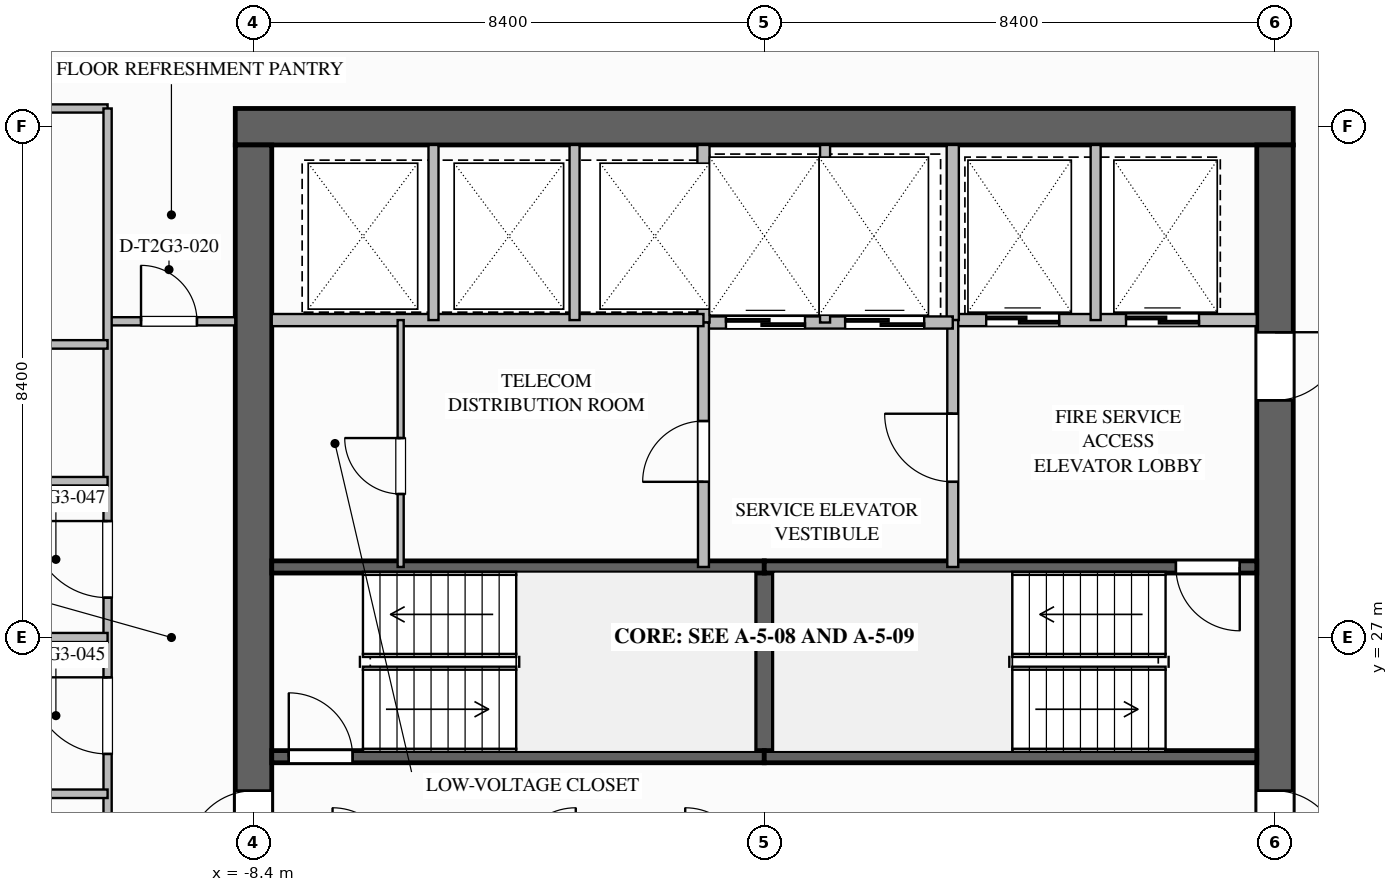
"""IFC4 building model, lengths in metres.
Left out: names, types, materials, properties, quantities, classifications, styles, units other than length and angle.
Written with IfcOpenShell. Run it as: python <this file> out.ifc"""

import sys

from ifc_helpers import new_model, si_unit, direction, frame, frame_2d, origin, place, context, subcontext, project, spatial, rectangle, extrude, element, fill, save


model = new_model("IFC4")
c1 = context("Model", 3, precision=1e-05, world=origin(), true_north=direction((0.0, 1.0)))
c2 = subcontext(c1, "Body", "Model", "MODEL_VIEW")
j1 = project(units=[si_unit("LENGTHUNIT", "METRE"), si_unit("PLANEANGLEUNIT", "RADIAN")], contexts=[c1])
p1 = place(None, origin())
s1 = spatial("IfcSite", under=j1, at=p1, CompositionType="ELEMENT")
p2 = place(p1, origin())
s2 = spatial("IfcBuilding", under=s1, at=p2, CompositionType="ELEMENT")
p3 = place(p2, frame((0.0, 0.0, 112.8)))
s3 = spatial("IfcBuildingStorey", under=s2, at=p3, CompositionType="ELEMENT", Elevation=112.8)
p4 = place(p3, frame((-8.7, 35.4, 0.0), z_axis=(0.0, 0.0, 1.0), x_axis=(1.0, 0.0, 0.0)))
e1 = element("IfcWall", 1, at=p4, inside=s3, PredefinedType="SHEAR", context=c2, shape_type="SweptSolid", body=[
    extrude(rectangle(XDim=17.4, YDim=0.6, at=frame_2d((8.7, 0.0))), origin(), (0.0, 0.0, 1.0), 3.5),
])
p5 = place(p3, frame((8.4, 35.1, 0.0), z_axis=(0.0, 0.0, 1.0), x_axis=(0.0, -1.0, 0.0)))
e2 = element("IfcWall", 2, at=p5, inside=s3, PredefinedType="SHEAR", context=c2, shape_type="SweptSolid", body=[
    extrude(rectangle(XDim=16.2, YDim=0.6, at=frame_2d((8.1, 0.0))), origin(), (0.0, 0.0, 1.0), 3.5),
])
p6 = place(p5, frame((3.08, 0.0, 0.0)))
e3 = element("IfcOpeningElement", 3, at=p6, cuts=e2, PredefinedType="OPENING", context=c2, shape_type="SweptSolid", body=[
    extrude(rectangle(XDim=1.12, YDim=2.1, at=frame_2d((0.56, 1.05))), frame((0.0, 0.31, 0.0), z_axis=(0.0, -1.0, 0.0), x_axis=(1.0, 0.0, 0.0)), (0.0, 0.0, 1.0), 0.62),
])
p7 = place(p5, frame((10.62, 0.0, 0.0)))
e4 = element("IfcOpeningElement", 4, at=p7, cuts=e2, PredefinedType="OPENING", context=c2, shape_type="SweptSolid", body=[
    extrude(rectangle(XDim=1.08, YDim=2.04, at=frame_2d((0.54, 1.02))), frame((0.0, 0.31, 0.0), z_axis=(0.0, -1.0, 0.0), x_axis=(1.0, 0.0, 0.0)), (0.0, 0.0, 1.0), 0.62),
])
p8 = place(p3, frame((-8.4, 18.9, 0.0), z_axis=(0.0, 0.0, 1.0), x_axis=(0.0, 1.0, 0.0)))
e5 = element("IfcWall", 5, at=p8, inside=s3, PredefinedType="SHEAR", context=c2, shape_type="SweptSolid", body=[
    extrude(rectangle(XDim=16.2, YDim=0.6, at=frame_2d((8.1, 0.0))), origin(), (0.0, 0.0, 1.0), 3.5),
])
p9 = place(p8, frame((4.5, 0.0, 0.0)))
e6 = element("IfcOpeningElement", 6, at=p9, cuts=e5, PredefinedType="OPENING", context=c2, shape_type="SweptSolid", body=[
    extrude(rectangle(XDim=1.08, YDim=2.04, at=frame_2d((0.54, 1.02))), frame((0.0, 0.31, 0.0), z_axis=(0.0, -1.0, 0.0), x_axis=(1.0, 0.0, 0.0)), (0.0, 0.0, 1.0), 0.62),
])
p10 = place(p3, frame((0.0, 25.04, 0.0), z_axis=(0.0, 0.0, 1.0), x_axis=(0.0, 1.0, 0.0)))
e7 = element("IfcWall", 7, at=p10, inside=s3, PredefinedType="SOLIDWALL", context=c2, shape_type="SweptSolid", body=[
    extrude(rectangle(XDim=3.12, YDim=0.3, at=frame_2d((1.56, 0.0))), origin(), (0.0, 0.0, 1.0), 3.24),
])
p11 = place(p3, frame((-8.1, 25.04, 0.0), z_axis=(0.0, 0.0, 1.0), x_axis=(1.0, 0.0, 0.0)))
e8 = element("IfcWall", 8, at=p11, inside=s3, PredefinedType="SOLIDWALL", context=c2, shape_type="SweptSolid", body=[
    extrude(rectangle(XDim=8.1, YDim=0.2, at=frame_2d((4.05, 0.0))), origin(), (0.0, 0.0, 1.0), 3.24),
])
p12 = place(p11, frame((0.28, 0.0, 0.0)))
e9 = element("IfcOpeningElement", 9, at=p12, cuts=e8, PredefinedType="OPENING", context=c2, shape_type="SweptSolid", body=[
    extrude(rectangle(XDim=1.05, YDim=2.1, at=frame_2d((0.525, 1.05))), frame((0.0, 0.11, 0.0), z_axis=(0.0, -1.0, 0.0), x_axis=(1.0, 0.0, 0.0)), (0.0, 0.0, 1.0), 0.22),
])
for number, where, z_axis, x_axis in (
    (10, (-8.1, 28.16, 0.0), (0.0, 0.0, 1.0), (1.0, 0.0, 0.0)),
    (11, (0.0, 25.04, 0.0), (0.0, 0.0, 1.0), (1.0, 0.0, 0.0)),
):
    element("IfcWall", number, at=place(p3, frame(where, z_axis=z_axis, x_axis=x_axis)), inside=s3, PredefinedType="SOLIDWALL", context=c2, shape_type="SweptSolid", body=[
        extrude(rectangle(XDim=8.1, YDim=0.2, at=frame_2d((4.05, 0.0))), origin(), (0.0, 0.0, 1.0), 3.24),
    ])
p13 = place(p3, frame((8.1, 28.16, 0.0), z_axis=(0.0, 0.0, 1.0), x_axis=(-1.0, 0.0, 0.0)))
e12 = element("IfcWall", 12, at=p13, inside=s3, PredefinedType="SOLIDWALL", context=c2, shape_type="SweptSolid", body=[
    extrude(rectangle(XDim=8.1, YDim=0.2, at=frame_2d((4.05, 0.0))), origin(), (0.0, 0.0, 1.0), 3.24),
])
p14 = place(p13, frame((0.28, 0.0, 0.0)))
e13 = element("IfcOpeningElement", 13, at=p14, cuts=e12, PredefinedType="OPENING", context=c2, shape_type="SweptSolid", body=[
    extrude(rectangle(XDim=1.05, YDim=2.1, at=frame_2d((0.525, 1.05))), frame((0.0, 0.11, 0.0), z_axis=(0.0, -1.0, 0.0), x_axis=(1.0, 0.0, 0.0)), (0.0, 0.0, 1.0), 0.22),
])
p15 = place(p3, frame((3.1, 32.22, 0.0), z_axis=(0.0, 0.0, 1.0), x_axis=(1.0, 0.0, 0.0)))
e14 = element("IfcWall", 14, at=p15, inside=s3, PredefinedType="SOLIDWALL", context=c2, shape_type="SweptSolid", body=[
    extrude(rectangle(XDim=5.0, YDim=0.2, at=frame_2d((2.5, 0.0))), origin(), (0.0, 0.0, 1.0), 3.24),
])
p16 = place(p15, frame((0.55, 0.0, 0.0)))
e15 = element("IfcOpeningElement", 15, at=p16, cuts=e14, PredefinedType="OPENING", context=c2, shape_type="SweptSolid", body=[
    extrude(rectangle(XDim=1.2, YDim=2.2, at=frame_2d((0.6, 1.1))), frame((0.0, 0.11, 0.0), z_axis=(0.0, -1.0, 0.0), x_axis=(1.0, 0.0, 0.0)), (0.0, 0.0, 1.0), 0.22),
])
p17 = place(p15, frame((2.85, 0.0, 0.0)))
e16 = element("IfcOpeningElement", 16, at=p17, cuts=e14, PredefinedType="OPENING", context=c2, shape_type="SweptSolid", body=[
    extrude(rectangle(XDim=1.2, YDim=2.2, at=frame_2d((0.6, 1.1))), frame((0.0, 0.11, 0.0), z_axis=(0.0, -1.0, 0.0), x_axis=(1.0, 0.0, 0.0)), (0.0, 0.0, 1.0), 0.22),
])
p18 = place(p3, frame((3.1, 32.22, 0.0), z_axis=(0.0, 0.0, 1.0), x_axis=(0.0, 1.0, 0.0)))
e17 = element("IfcWall", 17, at=p18, inside=s3, PredefinedType="SOLIDWALL", context=c2, shape_type="SweptSolid", body=[
    extrude(rectangle(XDim=2.88, YDim=0.2, at=frame_2d((1.44, 0.0))), origin(), (0.0, 0.0, 1.0), 3.24),
])
p19 = place(p3, frame((5.45, 32.22, 0.0), z_axis=(0.0, 0.0, 1.0), x_axis=(0.0, 1.0, 0.0)))
e18 = element("IfcWall", 18, at=p19, inside=s3, PredefinedType="PARTITIONING", context=c2, shape_type="SweptSolid", body=[
    extrude(rectangle(XDim=2.88, YDim=0.165, at=frame_2d((1.44, 0.0))), origin(), (0.0, 0.0, 1.0), 3.24),
])
p20 = place(p3, frame((3.1, 28.16, 0.0), z_axis=(0.0, 0.0, 1.0), x_axis=(0.0, 1.0, 0.0)))
e19 = element("IfcWall", 19, at=p20, inside=s3, PredefinedType="SOLIDWALL", context=c2, shape_type="SweptSolid", body=[
    extrude(rectangle(XDim=4.06, YDim=0.18, at=frame_2d((2.03, 0.0))), origin(), (0.0, 0.0, 1.0), 3.24),
])
p21 = place(p20, frame((1.4, 0.0, 0.0)))
e20 = element("IfcOpeningElement", 20, at=p21, cuts=e19, PredefinedType="OPENING", context=c2, shape_type="SweptSolid", body=[
    extrude(rectangle(XDim=1.12, YDim=2.1, at=frame_2d((0.56, 1.05))), frame((0.0, 0.1, 0.0), z_axis=(0.0, -1.0, 0.0), x_axis=(1.0, 0.0, 0.0)), (0.0, 0.0, 1.0), 0.2),
])
p22 = place(p3, frame((-1.0, 32.18, 0.0), z_axis=(0.0, 0.0, 1.0), x_axis=(1.0, 0.0, 0.0)))
e21 = element("IfcWall", 21, at=p22, inside=s3, PredefinedType="SOLIDWALL", context=c2, shape_type="SweptSolid", body=[
    extrude(rectangle(XDim=4.1, YDim=0.2, at=frame_2d((2.05, 0.0))), origin(), (0.0, 0.0, 1.0), 3.24),
])
p23 = place(p22, frame((0.37, 0.0, 0.0)))
e22 = element("IfcOpeningElement", 22, at=p23, cuts=e21, PredefinedType="OPENING", context=c2, shape_type="SweptSolid", body=[
    extrude(rectangle(XDim=1.3, YDim=2.2, at=frame_2d((0.65, 1.1))), frame((0.0, 0.11, 0.0), z_axis=(0.0, -1.0, 0.0), x_axis=(1.0, 0.0, 0.0)), (0.0, 0.0, 1.0), 0.22),
])
p24 = place(p22, frame((2.33, 0.0, 0.0)))
e23 = element("IfcOpeningElement", 23, at=p24, cuts=e21, PredefinedType="OPENING", context=c2, shape_type="SweptSolid", body=[
    extrude(rectangle(XDim=1.3, YDim=2.2, at=frame_2d((0.65, 1.1))), frame((0.0, 0.11, 0.0), z_axis=(0.0, -1.0, 0.0), x_axis=(1.0, 0.0, 0.0)), (0.0, 0.0, 1.0), 0.22),
])
p25 = place(p3, frame((-1.0, 32.18, 0.0), z_axis=(0.0, 0.0, 1.0), x_axis=(0.0, 1.0, 0.0)))
e24 = element("IfcWall", 24, at=p25, inside=s3, PredefinedType="SOLIDWALL", context=c2, shape_type="SweptSolid", body=[
    extrude(rectangle(XDim=2.92, YDim=0.2, at=frame_2d((1.46, 0.0))), origin(), (0.0, 0.0, 1.0), 3.24),
])
p26 = place(p3, frame((1.0, 32.18, 0.0), z_axis=(0.0, 0.0, 1.0), x_axis=(0.0, 1.0, 0.0)))
e25 = element("IfcWall", 25, at=p26, inside=s3, PredefinedType="PARTITIONING", context=c2, shape_type="SweptSolid", body=[
    extrude(rectangle(XDim=2.92, YDim=0.165, at=frame_2d((1.46, 0.0))), origin(), (0.0, 0.0, 1.0), 3.24),
])
p27 = place(p3, frame((-1.0, 28.16, 0.0), z_axis=(0.0, 0.0, 1.0), x_axis=(0.0, 1.0, 0.0)))
e26 = element("IfcWall", 26, at=p27, inside=s3, PredefinedType="SOLIDWALL", context=c2, shape_type="SweptSolid", body=[
    extrude(rectangle(XDim=4.02, YDim=0.18, at=frame_2d((2.01, 0.0))), origin(), (0.0, 0.0, 1.0), 3.24),
])
p28 = place(p27, frame((1.4, 0.0, 0.0)))
e27 = element("IfcOpeningElement", 27, at=p28, cuts=e26, PredefinedType="OPENING", context=c2, shape_type="SweptSolid", body=[
    extrude(rectangle(XDim=1.0, YDim=2.1, at=frame_2d((0.5, 1.05))), frame((0.0, 0.1, 0.0), z_axis=(0.0, -1.0, 0.0), x_axis=(1.0, 0.0, 0.0)), (0.0, 0.0, 1.0), 0.2),
])
p29 = place(p3, frame((-8.1, 32.22, 0.0), z_axis=(0.0, 0.0, 1.0), x_axis=(1.0, 0.0, 0.0)))
e28 = element("IfcWall", 28, at=p29, inside=s3, PredefinedType="SOLIDWALL", context=c2, shape_type="SweptSolid", body=[
    extrude(rectangle(XDim=7.1, YDim=0.2, at=frame_2d((3.55, 0.0))), origin(), (0.0, 0.0, 1.0), 3.24),
])
for number, where, z_axis, x_axis in (
    (29, (-5.44, 32.22, 0.0), (0.0, 0.0, 1.0), (0.0, 1.0, 0.0)),
    (30, (-3.12, 32.22, 0.0), (0.0, 0.0, 1.0), (0.0, 1.0, 0.0)),
):
    element("IfcWall", number, at=place(p3, frame(where, z_axis=z_axis, x_axis=x_axis)), inside=s3, PredefinedType="PARTITIONING", context=c2, shape_type="SweptSolid", body=[
        extrude(rectangle(XDim=2.88, YDim=0.165, at=frame_2d((1.44, 0.0))), origin(), (0.0, 0.0, 1.0), 3.24),
    ])
p30 = place(p3, frame((-5.98, 28.16, 0.0), z_axis=(0.0, 0.0, 1.0), x_axis=(0.0, 1.0, 0.0)))
e31 = element("IfcWall", 31, at=p30, inside=s3, PredefinedType="PARTITIONING", context=c2, shape_type="SweptSolid", body=[
    extrude(rectangle(XDim=4.06, YDim=0.1, at=frame_2d((2.03, 0.0))), origin(), (0.0, 0.0, 1.0), 3.24),
])
p31 = place(p30, frame((1.2, 0.0, 0.0)))
e32 = element("IfcOpeningElement", 32, at=p31, cuts=e31, PredefinedType="OPENING", context=c2, shape_type="SweptSolid", body=[
    extrude(rectangle(XDim=0.92, YDim=2.1, at=frame_2d((0.46, 1.05))), frame((0.0, 0.06, 0.0), z_axis=(0.0, -1.0, 0.0), x_axis=(1.0, 0.0, 0.0)), (0.0, 0.0, 1.0), 0.12),
])
p32 = place(p3, frame((-10.8, 32.2, 0.0), z_axis=(0.0, 0.0, 1.0), x_axis=(1.0, 0.0, 0.0)))
e33 = element("IfcWall", 33, at=p32, inside=s3, PredefinedType="PARTITIONING", context=c2, shape_type="SweptSolid", body=[
    extrude(rectangle(XDim=2.1, YDim=0.135, at=frame_2d((1.05, 0.0))), origin(), (0.0, 0.0, 1.0), 3.24),
])
p33 = place(p32, frame((0.55, 0.0, 0.0)))
e34 = element("IfcOpeningElement", 34, at=p33, cuts=e33, PredefinedType="OPENING", context=c2, shape_type="SweptSolid", body=[
    extrude(rectangle(XDim=0.92, YDim=2.1, at=frame_2d((0.46, 1.05))), frame((0.0, 0.077, 0.0), z_axis=(0.0, -1.0, 0.0), x_axis=(1.0, 0.0, 0.0)), (0.0, 0.0, 1.0), 0.155),
])
p34 = place(p3, frame((-16.2, 35.7, 0.0), z_axis=(0.0, 0.0, 1.0), x_axis=(1.0, 0.0, 0.0)))
e35 = element("IfcWall", 35, at=p34, inside=s3, PredefinedType="PARTITIONING", context=c2, shape_type="SweptSolid", body=[
    extrude(rectangle(XDim=5.4, YDim=0.135, at=frame_2d((2.7, 0.0))), origin(), (0.0, 0.0, 1.0), 3.24),
])
p35 = place(p3, frame((-10.8, 18.3, 0.0), z_axis=(0.0, 0.0, 1.0), x_axis=(0.0, 1.0, 0.0)))
e36 = element("IfcWall", 36, at=p35, inside=s3, PredefinedType="PARTITIONING", context=c2, shape_type="SweptSolid", body=[
    extrude(rectangle(XDim=17.4, YDim=0.135, at=frame_2d((8.7, 0.0))), origin(), (0.0, 0.0, 1.0), 3.24),
])
p36 = place(p35, frame((6.785, 0.0, 0.0)))
e37 = element("IfcOpeningElement", 37, at=p36, cuts=e36, PredefinedType="OPENING", context=c2, shape_type="SweptSolid", body=[
    extrude(rectangle(XDim=1.26, YDim=2.2, at=frame_2d((0.63, 1.1))), frame((0.0, 0.077, 0.0), z_axis=(0.0, -1.0, 0.0), x_axis=(1.0, 0.0, 0.0)), (0.0, 0.0, 1.0), 0.155),
])
p37 = place(p35, frame((9.355, 0.0, 0.0)))
e38 = element("IfcOpeningElement", 38, at=p37, cuts=e36, PredefinedType="OPENING", context=c2, shape_type="SweptSolid", body=[
    extrude(rectangle(XDim=1.26, YDim=2.2, at=frame_2d((0.63, 1.1))), frame((0.0, 0.077, 0.0), z_axis=(0.0, -1.0, 0.0), x_axis=(1.0, 0.0, 0.0)), (0.0, 0.0, 1.0), 0.155),
])
p38 = place(p3, frame((-26.2, 27.0, 0.0), z_axis=(0.0, 0.0, 1.0), x_axis=(1.0, 0.0, 0.0)))
e39 = element("IfcWall", 39, at=p38, inside=s3, PredefinedType="PARTITIONING", context=c2, shape_type="SweptSolid", body=[
    extrude(rectangle(XDim=15.4, YDim=0.15, at=frame_2d((7.7, 0.0))), origin(), (0.0, 0.0, 1.0), 2.452),
])
for number, where, z_axis, x_axis in (
    (40, (-10.8, 24.43, 0.0), (0.0, 0.0, 1.0), (-1.0, 0.0, 0.0)),
    (41, (-10.8, 29.57, 0.0), (0.0, 0.0, 1.0), (-1.0, 0.0, 0.0)),
    (42, (-10.8, 31.82, 0.0), (0.0, 0.0, 1.0), (-1.0, 0.0, 0.0)),
):
    element("IfcWall", number, at=place(p3, frame(where, z_axis=z_axis, x_axis=x_axis)), inside=s3, PredefinedType="PLUMBINGWALL", context=c2, shape_type="SweptSolid", body=[
        extrude(rectangle(XDim=2.15, YDim=0.14, at=frame_2d((1.075, 0.0))), origin(), (0.0, 0.0, 1.0), 3.24),
    ])
p39 = place(p12, origin())
e43 = element("IfcDoor", 43, at=p39, inside=s3, OperationType="SINGLE_SWING_LEFT", PredefinedType="DOOR", context=c2, shape_type="SweptSolid", body=[
    extrude(rectangle(XDim=1.05, YDim=2.1, at=frame_2d((0.525, 1.05))), frame((0.0, 0.025, 0.0), z_axis=(0.0, -1.0, 0.0), x_axis=(1.0, 0.0, 0.0)), (0.0, 0.0, 1.0), 0.05),
])
fill(e9, e43)
p40 = place(p14, origin())
e44 = element("IfcDoor", 44, at=p40, inside=s3, OperationType="SINGLE_SWING_LEFT", PredefinedType="DOOR", context=c2, shape_type="SweptSolid", body=[
    extrude(rectangle(XDim=1.05, YDim=2.1, at=frame_2d((0.525, 1.05))), frame((0.0, 0.025, 0.0), z_axis=(0.0, -1.0, 0.0), x_axis=(1.0, 0.0, 0.0)), (0.0, 0.0, 1.0), 0.05),
])
fill(e13, e44)
p41 = place(p16, origin())
e45 = element("IfcDoor", 45, at=p41, inside=s3, OperationType="SLIDING_TO_LEFT", PredefinedType="DOOR", context=c2, shape_type="SweptSolid", body=[
    extrude(rectangle(XDim=1.2, YDim=2.2, at=frame_2d((0.6, 1.1))), frame((0.0, 0.025, 0.0), z_axis=(0.0, -1.0, 0.0), x_axis=(1.0, 0.0, 0.0)), (0.0, 0.0, 1.0), 0.05),
])
fill(e15, e45)
p42 = place(p17, origin())
e46 = element("IfcDoor", 46, at=p42, inside=s3, OperationType="SLIDING_TO_LEFT", PredefinedType="DOOR", context=c2, shape_type="SweptSolid", body=[
    extrude(rectangle(XDim=1.2, YDim=2.2, at=frame_2d((0.6, 1.1))), frame((0.0, 0.025, 0.0), z_axis=(0.0, -1.0, 0.0), x_axis=(1.0, 0.0, 0.0)), (0.0, 0.0, 1.0), 0.05),
])
fill(e16, e46)
p43 = place(p21, origin())
e47 = element("IfcDoor", 47, at=p43, inside=s3, OperationType="SINGLE_SWING_RIGHT", PredefinedType="DOOR", context=c2, shape_type="SweptSolid", body=[
    extrude(rectangle(XDim=1.12, YDim=2.1, at=frame_2d((0.56, 1.05))), frame((0.0, 0.025, 0.0), z_axis=(0.0, -1.0, 0.0), x_axis=(1.0, 0.0, 0.0)), (0.0, 0.0, 1.0), 0.05),
])
fill(e20, e47)
p44 = place(p6, origin())
e48 = element("IfcDoor", 48, at=p44, inside=s3, OperationType="SINGLE_SWING_LEFT", PredefinedType="DOOR", context=c2, shape_type="SweptSolid", body=[
    extrude(rectangle(XDim=1.12, YDim=2.1, at=frame_2d((0.56, 1.05))), frame((0.0, 0.025, 0.0), z_axis=(0.0, -1.0, 0.0), x_axis=(1.0, 0.0, 0.0)), (0.0, 0.0, 1.0), 0.05),
])
fill(e3, e48)
p45 = place(p23, origin())
e49 = element("IfcDoor", 49, at=p45, inside=s3, OperationType="SLIDING_TO_LEFT", PredefinedType="DOOR", context=c2, shape_type="SweptSolid", body=[
    extrude(rectangle(XDim=1.3, YDim=2.2, at=frame_2d((0.65, 1.1))), frame((0.0, 0.025, 0.0), z_axis=(0.0, -1.0, 0.0), x_axis=(1.0, 0.0, 0.0)), (0.0, 0.0, 1.0), 0.05),
])
fill(e22, e49)
p46 = place(p24, origin())
e50 = element("IfcDoor", 50, at=p46, inside=s3, OperationType="SLIDING_TO_LEFT", PredefinedType="DOOR", context=c2, shape_type="SweptSolid", body=[
    extrude(rectangle(XDim=1.3, YDim=2.2, at=frame_2d((0.65, 1.1))), frame((0.0, 0.025, 0.0), z_axis=(0.0, -1.0, 0.0), x_axis=(1.0, 0.0, 0.0)), (0.0, 0.0, 1.0), 0.05),
])
fill(e23, e50)
p47 = place(p28, origin())
e51 = element("IfcDoor", 51, at=p47, inside=s3, OperationType="SINGLE_SWING_LEFT", PredefinedType="DOOR", context=c2, shape_type="SweptSolid", body=[
    extrude(rectangle(XDim=1.0, YDim=2.1, at=frame_2d((0.5, 1.05))), frame((0.0, 0.025, 0.0), z_axis=(0.0, -1.0, 0.0), x_axis=(1.0, 0.0, 0.0)), (0.0, 0.0, 1.0), 0.05),
])
fill(e27, e51)
p48 = place(p31, origin())
e52 = element("IfcDoor", 52, at=p48, inside=s3, OperationType="SINGLE_SWING_RIGHT", PredefinedType="DOOR", context=c2, shape_type="SweptSolid", body=[
    extrude(rectangle(XDim=0.92, YDim=2.1, at=frame_2d((0.46, 1.05))), frame((0.0, 0.025, 0.0), z_axis=(0.0, -1.0, 0.0), x_axis=(1.0, 0.0, 0.0)), (0.0, 0.0, 1.0), 0.05),
])
fill(e32, e52)
p49 = place(p9, origin())
e53 = element("IfcDoor", 53, at=p49, inside=s3, OperationType="SINGLE_SWING_LEFT", PredefinedType="DOOR", context=c2, shape_type="SweptSolid", body=[
    extrude(rectangle(XDim=1.08, YDim=2.04, at=frame_2d((0.54, 1.02))), frame((0.0, 0.025, 0.0), z_axis=(0.0, -1.0, 0.0), x_axis=(1.0, 0.0, 0.0)), (0.0, 0.0, 1.0), 0.05),
])
fill(e6, e53)
p50 = place(p7, origin())
e54 = element("IfcDoor", 54, at=p50, inside=s3, OperationType="SINGLE_SWING_RIGHT", PredefinedType="DOOR", context=c2, shape_type="SweptSolid", body=[
    extrude(rectangle(XDim=1.08, YDim=2.04, at=frame_2d((0.54, 1.02))), frame((0.0, 0.025, 0.0), z_axis=(0.0, -1.0, 0.0), x_axis=(1.0, 0.0, 0.0)), (0.0, 0.0, 1.0), 0.05),
])
fill(e4, e54)
p51 = place(p33, origin())
e55 = element("IfcDoor", 55, at=p51, inside=s3, OperationType="SINGLE_SWING_LEFT", PredefinedType="DOOR", context=c2, shape_type="SweptSolid", body=[
    extrude(rectangle(XDim=0.92, YDim=2.1, at=frame_2d((0.46, 1.05))), frame((0.0, 0.025, 0.0), z_axis=(0.0, -1.0, 0.0), x_axis=(1.0, 0.0, 0.0)), (0.0, 0.0, 1.0), 0.05),
])
fill(e34, e55)
p52 = place(p36, origin())
e56 = element("IfcDoor", 56, at=p52, inside=s3, OperationType="SINGLE_SWING_RIGHT", PredefinedType="DOOR", context=c2, shape_type="SweptSolid", body=[
    extrude(rectangle(XDim=1.26, YDim=2.2, at=frame_2d((0.63, 1.1))), frame((0.0, 0.025, 0.0), z_axis=(0.0, -1.0, 0.0), x_axis=(1.0, 0.0, 0.0)), (0.0, 0.0, 1.0), 0.05),
])
fill(e37, e56)
p53 = place(p37, origin())
e57 = element("IfcDoor", 57, at=p53, inside=s3, OperationType="SINGLE_SWING_RIGHT", PredefinedType="DOOR", context=c2, shape_type="SweptSolid", body=[
    extrude(rectangle(XDim=1.26, YDim=2.2, at=frame_2d((0.63, 1.1))), frame((0.0, 0.025, 0.0), z_axis=(0.0, -1.0, 0.0), x_axis=(1.0, 0.0, 0.0)), (0.0, 0.0, 1.0), 0.05),
])
fill(e38, e57)
save(model, sys.argv[1])
